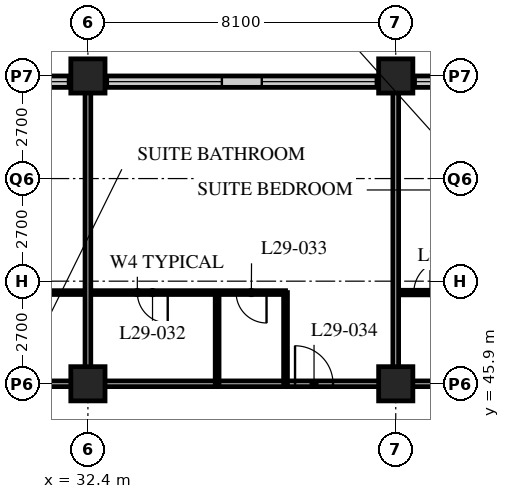
"""IFC4 building model, lengths in metres.
Left out: names, types, materials, properties, quantities, classifications, styles, units other than length and angle.
Written with IfcOpenShell. Run it as: python <this file> out.ifc"""

import sys

from ifc_helpers import new_model, si_unit, direction, frame, frame_2d, origin, origin_2d, place, context, subcontext, project, spatial, rectangle, hollow_rectangle, extrude, element, fill, save


model = new_model("IFC4")
c1 = context("Model", 3, precision=1e-05, world=origin(), true_north=direction((0.0, 1.0)))
c2 = subcontext(c1, "Body", "Model", "MODEL_VIEW")
j1 = project(units=[si_unit("LENGTHUNIT", "METRE"), si_unit("PLANEANGLEUNIT", "RADIAN")], contexts=[c1])
p1 = place(None, origin())
s1 = spatial("IfcSite", under=j1, at=p1, CompositionType="ELEMENT")
p2 = place(p1, origin())
s2 = spatial("IfcBuilding", under=s1, at=p2, CompositionType="ELEMENT")
p3 = place(p2, frame((0.0, 0.0, 117.0)))
s3 = spatial("IfcBuildingStorey", under=s2, at=p3, CompositionType="ELEMENT", Elevation=117.0)
for number, where, z_axis, x_axis in (
    (1, (32.4, 45.9, 0.0), (0.0, 0.0, 1.0), (1.0, 0.0, 0.0)),
    (2, (32.4, 54.0, 0.0), (0.0, 0.0, 1.0), (1.0, 0.0, 0.0)),
    (3, (40.5, 45.9, 0.0), (0.0, 0.0, 1.0), (1.0, 0.0, 0.0)),
    (4, (40.5, 54.0, 0.0), (0.0, 0.0, 1.0), (1.0, 0.0, 0.0)),
):
    element("IfcColumn", number, at=place(p3, frame(where, z_axis=z_axis, x_axis=x_axis)), inside=s3, PredefinedType="COLUMN", context=c2, shape_type="SweptSolid", body=[
        extrude(hollow_rectangle(XDim=0.9, YDim=0.9, WallThickness=0.09, at=origin_2d()), origin(), (0.0, 0.0, 1.0), 3.4),
    ])
p4 = place(p3, frame((48.3, 53.85, 0.0), z_axis=(0.0, 0.0, 1.0), x_axis=(-1.0, 0.0, 0.0)))
e5 = element("IfcWall", 5, at=p4, inside=s3, PredefinedType="SOLIDWALL", context=c2, shape_type="SweptSolid", body=[
    extrude(rectangle(XDim=40.2, YDim=0.3, at=frame_2d((20.1, 0.0))), origin(), (0.0, 0.0, 1.0), 3.19),
])
p5 = place(p4, frame((0.225, 0.0, 0.9)))
e6 = element("IfcOpeningElement", 6, at=p5, cuts=e5, PredefinedType="OPENING", context=c2, shape_type="SweptSolid", body=[
    extrude(rectangle(XDim=3.0, YDim=2.0, at=frame_2d((1.5, 1.0))), frame((0.0, 0.16, 0.0), z_axis=(0.0, -1.0, 0.0), x_axis=(1.0, 0.0, 0.0)), (0.0, 0.0, 1.0), 0.32),
])
p6 = place(p4, frame((4.275, 0.0, 0.9)))
e7 = element("IfcOpeningElement", 7, at=p6, cuts=e5, PredefinedType="OPENING", context=c2, shape_type="SweptSolid", body=[
    extrude(rectangle(XDim=3.0, YDim=2.0, at=frame_2d((1.5, 1.0))), frame((0.0, 0.16, 0.0), z_axis=(0.0, -1.0, 0.0), x_axis=(1.0, 0.0, 0.0)), (0.0, 0.0, 1.0), 0.32),
])
p7 = place(p4, frame((8.325, 0.0, 0.9)))
e8 = element("IfcOpeningElement", 8, at=p7, cuts=e5, PredefinedType="OPENING", context=c2, shape_type="SweptSolid", body=[
    extrude(rectangle(XDim=3.0, YDim=2.0, at=frame_2d((1.5, 1.0))), frame((0.0, 0.16, 0.0), z_axis=(0.0, -1.0, 0.0), x_axis=(1.0, 0.0, 0.0)), (0.0, 0.0, 1.0), 0.32),
])
p8 = place(p4, frame((12.375, 0.0, 0.9)))
e9 = element("IfcOpeningElement", 9, at=p8, cuts=e5, PredefinedType="OPENING", context=c2, shape_type="SweptSolid", body=[
    extrude(rectangle(XDim=3.0, YDim=2.0, at=frame_2d((1.5, 1.0))), frame((0.0, 0.16, 0.0), z_axis=(0.0, -1.0, 0.0), x_axis=(1.0, 0.0, 0.0)), (0.0, 0.0, 1.0), 0.32),
])
p9 = place(p4, frame((16.425, 0.0, 0.9)))
e10 = element("IfcOpeningElement", 10, at=p9, cuts=e5, PredefinedType="OPENING", context=c2, shape_type="SweptSolid", body=[
    extrude(rectangle(XDim=3.0, YDim=2.0, at=frame_2d((1.5, 1.0))), frame((0.0, 0.16, 0.0), z_axis=(0.0, -1.0, 0.0), x_axis=(1.0, 0.0, 0.0)), (0.0, 0.0, 1.0), 0.32),
])
p10 = place(p4, frame((20.475, 0.0, 0.9)))
e11 = element("IfcOpeningElement", 11, at=p10, cuts=e5, PredefinedType="OPENING", context=c2, shape_type="SweptSolid", body=[
    extrude(rectangle(XDim=3.0, YDim=2.0, at=frame_2d((1.5, 1.0))), frame((0.0, 0.16, 0.0), z_axis=(0.0, -1.0, 0.0), x_axis=(1.0, 0.0, 0.0)), (0.0, 0.0, 1.0), 0.32),
])
p11 = place(p4, frame((24.525, 0.0, 0.9)))
e12 = element("IfcOpeningElement", 12, at=p11, cuts=e5, PredefinedType="OPENING", context=c2, shape_type="SweptSolid", body=[
    extrude(rectangle(XDim=3.0, YDim=2.0, at=frame_2d((1.5, 1.0))), frame((0.0, 0.16, 0.0), z_axis=(0.0, -1.0, 0.0), x_axis=(1.0, 0.0, 0.0)), (0.0, 0.0, 1.0), 0.32),
])
p12 = place(p4, frame((28.575, 0.0, 0.9)))
e13 = element("IfcOpeningElement", 13, at=p12, cuts=e5, PredefinedType="OPENING", context=c2, shape_type="SweptSolid", body=[
    extrude(rectangle(XDim=3.0, YDim=2.0, at=frame_2d((1.5, 1.0))), frame((0.0, 0.16, 0.0), z_axis=(0.0, -1.0, 0.0), x_axis=(1.0, 0.0, 0.0)), (0.0, 0.0, 1.0), 0.32),
])
p13 = place(p4, frame((32.625, 0.0, 0.9)))
e14 = element("IfcOpeningElement", 14, at=p13, cuts=e5, PredefinedType="OPENING", context=c2, shape_type="SweptSolid", body=[
    extrude(rectangle(XDim=3.0, YDim=2.0, at=frame_2d((1.5, 1.0))), frame((0.0, 0.16, 0.0), z_axis=(0.0, -1.0, 0.0), x_axis=(1.0, 0.0, 0.0)), (0.0, 0.0, 1.0), 0.32),
])
p14 = place(p4, frame((36.675, 0.0, 0.9)))
e15 = element("IfcOpeningElement", 15, at=p14, cuts=e5, PredefinedType="OPENING", context=c2, shape_type="SweptSolid", body=[
    extrude(rectangle(XDim=3.0, YDim=2.0, at=frame_2d((1.5, 1.0))), frame((0.0, 0.16, 0.0), z_axis=(0.0, -1.0, 0.0), x_axis=(1.0, 0.0, 0.0)), (0.0, 0.0, 1.0), 0.32),
])
p15 = place(p3, frame((12.15, 45.9, 0.0), z_axis=(0.0, 0.0, 1.0), x_axis=(1.0, 0.0, 0.0)))
e16 = element("IfcWall", 16, at=p15, inside=s3, PredefinedType="PARTITIONING", context=c2, shape_type="SweptSolid", body=[
    extrude(rectangle(XDim=32.4, YDim=0.15, at=frame_2d((16.2, 0.0))), origin(), (0.0, 0.0, 1.0), 2.578),
])
p16 = place(p15, frame((5.95, 0.0, 0.0)))
e17 = element("IfcOpeningElement", 17, at=p16, cuts=e16, PredefinedType="OPENING", context=c2, shape_type="SweptSolid", body=[
    extrude(rectangle(XDim=1.0, YDim=2.1, at=frame_2d((0.5, 1.05))), frame((0.0, 0.085, 0.0), z_axis=(0.0, -1.0, 0.0), x_axis=(1.0, 0.0, 0.0)), (0.0, 0.0, 1.0), 0.17),
])
p17 = place(p15, frame((14.05, 0.0, 0.0)))
e18 = element("IfcOpeningElement", 18, at=p17, cuts=e16, PredefinedType="OPENING", context=c2, shape_type="SweptSolid", body=[
    extrude(rectangle(XDim=1.0, YDim=2.1, at=frame_2d((0.5, 1.05))), frame((0.0, 0.085, 0.0), z_axis=(0.0, -1.0, 0.0), x_axis=(1.0, 0.0, 0.0)), (0.0, 0.0, 1.0), 0.17),
])
p18 = place(p15, frame((25.7, 0.0, 0.0)))
e19 = element("IfcOpeningElement", 19, at=p18, cuts=e16, PredefinedType="OPENING", context=c2, shape_type="SweptSolid", body=[
    extrude(rectangle(XDim=1.0, YDim=2.1, at=frame_2d((0.5, 1.05))), frame((0.0, 0.085, 0.0), z_axis=(0.0, -1.0, 0.0), x_axis=(1.0, 0.0, 0.0)), (0.0, 0.0, 1.0), 0.17),
])
p19 = place(p15, frame((29.875, 0.0, 0.0)))
e20 = element("IfcOpeningElement", 20, at=p19, cuts=e16, PredefinedType="OPENING", context=c2, shape_type="SweptSolid", body=[
    extrude(rectangle(XDim=1.0, YDim=2.1, at=frame_2d((0.5, 1.05))), frame((0.0, 0.085, 0.0), z_axis=(0.0, -1.0, 0.0), x_axis=(1.0, 0.0, 0.0)), (0.0, 0.0, 1.0), 0.17),
])
p20 = place(p15, frame((1.525, 0.0, 0.0)))
e21 = element("IfcOpeningElement", 21, at=p20, cuts=e16, PredefinedType="OPENING", context=c2, shape_type="SweptSolid", body=[
    extrude(rectangle(XDim=1.0, YDim=2.1, at=frame_2d((0.5, 1.05))), frame((0.0, 0.085, 0.0), z_axis=(0.0, -1.0, 0.0), x_axis=(1.0, 0.0, 0.0)), (0.0, 0.0, 1.0), 0.17),
])
p21 = place(p3, frame((29.8, 48.3, 0.0), z_axis=(0.0, 0.0, 1.0), x_axis=(1.0, 0.0, 0.0)))
e22 = element("IfcWall", 22, at=p21, inside=s3, PredefinedType="PARTITIONING", context=c2, shape_type="SweptSolid", body=[
    extrude(rectangle(XDim=7.8, YDim=0.1, at=frame_2d((3.9, 0.0))), origin(), (0.0, 0.0, 1.0), 3.19),
])
p22 = place(p21, frame((3.9, 0.0, 0.0)))
e23 = element("IfcOpeningElement", 23, at=p22, cuts=e22, PredefinedType="OPENING", context=c2, shape_type="SweptSolid", body=[
    extrude(rectangle(XDim=0.8, YDim=2.1, at=frame_2d((0.4, 1.05))), frame((0.0, 0.06, 0.0), z_axis=(0.0, -1.0, 0.0), x_axis=(1.0, 0.0, 0.0)), (0.0, 0.0, 1.0), 0.12),
])
p23 = place(p21, frame((6.5, 0.0, 0.0)))
e24 = element("IfcOpeningElement", 24, at=p23, cuts=e22, PredefinedType="OPENING", context=c2, shape_type="SweptSolid", body=[
    extrude(rectangle(XDim=0.8, YDim=2.1, at=frame_2d((0.4, 1.05))), frame((0.0, 0.06, 0.0), z_axis=(0.0, -1.0, 0.0), x_axis=(1.0, 0.0, 0.0)), (0.0, 0.0, 1.0), 0.12),
])
p24 = place(p3, frame((32.4, 45.9, 0.0), z_axis=(0.0, 0.0, 1.0), x_axis=(0.0, 1.0, 0.0)))
e25 = element("IfcWall", 25, at=p24, inside=s3, PredefinedType="PARTITIONING", context=c2, shape_type="SweptSolid", body=[
    extrude(rectangle(XDim=7.8, YDim=0.15, at=frame_2d((3.9, 0.0))), origin(), (0.0, 0.0, 1.0), 2.578),
])
for number, where, z_axis, x_axis in (
    (26, (35.8, 45.9, 0.0), (0.0, 0.0, 1.0), (0.0, 1.0, 0.0)),
    (27, (37.6, 45.9, 0.0), (0.0, 0.0, 1.0), (0.0, 1.0, 0.0)),
):
    element("IfcWall", number, at=place(p3, frame(where, z_axis=z_axis, x_axis=x_axis)), inside=s3, PredefinedType="PARTITIONING", context=c2, shape_type="SweptSolid", body=[
        extrude(rectangle(XDim=2.4, YDim=0.1, at=frame_2d((1.2, 0.0))), origin(), (0.0, 0.0, 1.0), 3.19),
    ])
p25 = place(p3, frame((40.5, 48.3, 0.0), z_axis=(0.0, 0.0, 1.0), x_axis=(1.0, 0.0, 0.0)))
e28 = element("IfcWall", 28, at=p25, inside=s3, PredefinedType="PARTITIONING", context=c2, shape_type="SweptSolid", body=[
    extrude(rectangle(XDim=8.05, YDim=0.12, at=frame_2d((4.025, 0.0))), origin(), (0.0, 0.0, 1.0), 3.19),
])
p26 = place(p25, frame((0.475, 0.0, 0.0)))
e29 = element("IfcOpeningElement", 29, at=p26, cuts=e28, PredefinedType="OPENING", context=c2, shape_type="SweptSolid", body=[
    extrude(rectangle(XDim=0.85, YDim=2.1, at=frame_2d((0.425, 1.05))), frame((0.0, 0.07, 0.0), z_axis=(0.0, -1.0, 0.0), x_axis=(1.0, 0.0, 0.0)), (0.0, 0.0, 1.0), 0.14),
])
p27 = place(p25, frame((4.325, 0.0, 0.0)))
e30 = element("IfcOpeningElement", 30, at=p27, cuts=e28, PredefinedType="OPENING", context=c2, shape_type="SweptSolid", body=[
    extrude(rectangle(XDim=0.85, YDim=2.1, at=frame_2d((0.425, 1.05))), frame((0.0, 0.07, 0.0), z_axis=(0.0, -1.0, 0.0), x_axis=(1.0, 0.0, 0.0)), (0.0, 0.0, 1.0), 0.14),
])
p28 = place(p3, frame((40.5, 45.9, 0.0), z_axis=(0.0, 0.0, 1.0), x_axis=(0.0, 1.0, 0.0)))
e31 = element("IfcWall", 31, at=p28, inside=s3, PredefinedType="PARTITIONING", context=c2, shape_type="SweptSolid", body=[
    extrude(rectangle(XDim=7.8, YDim=0.15, at=frame_2d((3.9, 0.0))), origin(), (0.0, 0.0, 1.0), 2.578),
])
p29 = place(p6, origin())
e32 = element("IfcWindow", 32, at=p29, inside=s3, PartitioningType="SINGLE_PANEL", PredefinedType="WINDOW", context=c2, shape_type="SweptSolid", body=[
    extrude(rectangle(XDim=3.0, YDim=2.0, at=frame_2d((1.5, 1.0))), frame((0.0, 0.03, 0.0), z_axis=(0.0, -1.0, 0.0), x_axis=(1.0, 0.0, 0.0)), (0.0, 0.0, 1.0), 0.06),
])
fill(e7, e32)
p30 = place(p7, origin())
e33 = element("IfcWindow", 33, at=p30, inside=s3, PartitioningType="SINGLE_PANEL", PredefinedType="WINDOW", context=c2, shape_type="SweptSolid", body=[
    extrude(rectangle(XDim=3.0, YDim=2.0, at=frame_2d((1.5, 1.0))), frame((0.0, 0.03, 0.0), z_axis=(0.0, -1.0, 0.0), x_axis=(1.0, 0.0, 0.0)), (0.0, 0.0, 1.0), 0.06),
])
fill(e8, e33)
p31 = place(p8, origin())
e34 = element("IfcWindow", 34, at=p31, inside=s3, PartitioningType="SINGLE_PANEL", PredefinedType="WINDOW", context=c2, shape_type="SweptSolid", body=[
    extrude(rectangle(XDim=3.0, YDim=2.0, at=frame_2d((1.5, 1.0))), frame((0.0, 0.03, 0.0), z_axis=(0.0, -1.0, 0.0), x_axis=(1.0, 0.0, 0.0)), (0.0, 0.0, 1.0), 0.06),
])
fill(e9, e34)
p32 = place(p9, origin())
e35 = element("IfcWindow", 35, at=p32, inside=s3, PartitioningType="SINGLE_PANEL", PredefinedType="WINDOW", context=c2, shape_type="SweptSolid", body=[
    extrude(rectangle(XDim=3.0, YDim=2.0, at=frame_2d((1.5, 1.0))), frame((0.0, 0.03, 0.0), z_axis=(0.0, -1.0, 0.0), x_axis=(1.0, 0.0, 0.0)), (0.0, 0.0, 1.0), 0.06),
])
fill(e10, e35)
p33 = place(p22, origin())
e36 = element("IfcDoor", 36, at=p33, inside=s3, OperationType="SINGLE_SWING_LEFT", PredefinedType="DOOR", context=c2, shape_type="SweptSolid", body=[
    extrude(rectangle(XDim=0.8, YDim=2.1, at=frame_2d((0.4, 1.05))), frame((0.0, 0.025, 0.0), z_axis=(0.0, -1.0, 0.0), x_axis=(1.0, 0.0, 0.0)), (0.0, 0.0, 1.0), 0.05),
])
fill(e23, e36)
p34 = place(p23, origin())
e37 = element("IfcDoor", 37, at=p34, inside=s3, OperationType="SINGLE_SWING_LEFT", PredefinedType="DOOR", context=c2, shape_type="SweptSolid", body=[
    extrude(rectangle(XDim=0.8, YDim=2.1, at=frame_2d((0.4, 1.05))), frame((0.0, 0.025, 0.0), z_axis=(0.0, -1.0, 0.0), x_axis=(1.0, 0.0, 0.0)), (0.0, 0.0, 1.0), 0.05),
])
fill(e24, e37)
p35 = place(p18, origin())
e38 = element("IfcDoor", 38, at=p35, inside=s3, OperationType="SINGLE_SWING_LEFT", PredefinedType="DOOR", context=c2, shape_type="SweptSolid", body=[
    extrude(rectangle(XDim=1.0, YDim=2.1, at=frame_2d((0.5, 1.05))), frame((0.0, 0.025, 0.0), z_axis=(0.0, -1.0, 0.0), x_axis=(1.0, 0.0, 0.0)), (0.0, 0.0, 1.0), 0.05),
])
fill(e19, e38)
p36 = place(p26, origin())
e39 = element("IfcDoor", 39, at=p36, inside=s3, OperationType="SINGLE_SWING_RIGHT", PredefinedType="DOOR", context=c2, shape_type="SweptSolid", body=[
    extrude(rectangle(XDim=0.85, YDim=2.1, at=frame_2d((0.425, 1.05))), frame((0.0, 0.025, 0.0), z_axis=(0.0, -1.0, 0.0), x_axis=(1.0, 0.0, 0.0)), (0.0, 0.0, 1.0), 0.05),
])
fill(e29, e39)
save(model, sys.argv[1])
